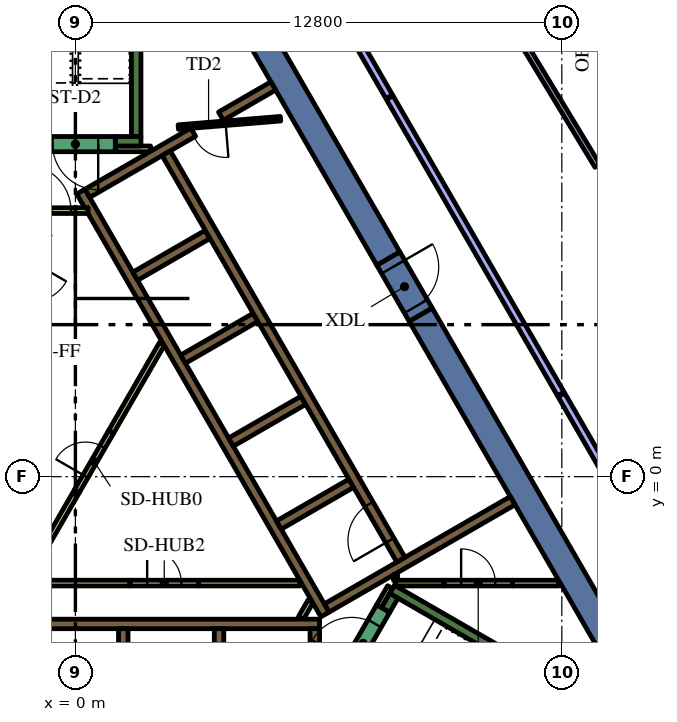
"""IFC4 building model, lengths in metres.
Left out: names, types, materials, properties, quantities, classifications, styles, units other than length and angle.
Written with IfcOpenShell. Run it as: python <this file> out.ifc"""

import sys

from ifc_helpers import new_model, si_unit, direction, frame, frame_2d, origin, place, context, subcontext, project, spatial, polyline, rectangle, outline, extrude, element, fill, save


model = new_model("IFC4")
c1 = context("Model", 3, precision=1e-05, world=origin(), true_north=direction((0.0, 1.0)))
c2 = subcontext(c1, "Body", "Model", "MODEL_VIEW")
j1 = project(units=[si_unit("LENGTHUNIT", "METRE"), si_unit("PLANEANGLEUNIT", "RADIAN")], contexts=[c1])
p1 = place(None, origin())
s1 = spatial("IfcSite", under=j1, at=p1, CompositionType="ELEMENT")
p2 = place(p1, origin())
s2 = spatial("IfcBuilding", under=s1, at=p2, CompositionType="ELEMENT")
p3 = place(p2, frame((0.0, 0.0, 205.8)))
s3 = spatial("IfcBuildingStorey", under=s2, at=p3, CompositionType="ELEMENT", Elevation=205.8)
for number, where, z_axis, x_axis in (
    (1, (9.085, 4.264, 0.0), (0.0, 0.0, 1.0), (0.5, -0.866, 0.0)),
    (2, (8.235, 5.736, 0.0), (0.0, 0.0, 1.0), (-0.5, 0.866, 0.0)),
):
    element("IfcWall", number, at=place(p3, frame(where, z_axis=z_axis, x_axis=x_axis)), inside=s3, PredefinedType="SOLIDWALL", context=c2, shape_type="SweptSolid", body=[
        extrude(rectangle(XDim=12.472, YDim=0.7, at=frame_2d((6.236, 0.0))), origin(), (0.0, 0.0, 1.0), 4.2),
    ])
p4 = place(p3, frame((8.334, -2.964, 0.0), z_axis=(0.0, 0.0, 1.0), x_axis=(0.866016039709, -0.500016218704, 0.0)))
e3 = element("IfcWall", 3, at=p4, inside=s3, PredefinedType="SOLIDWALL", context=c2, shape_type="SweptSolid", body=[
    extrude(rectangle(XDim=7.05, YDim=0.25, at=frame_2d((3.525, 0.0))), origin(), (0.0, 0.0, 1.0), 4.2),
])
p5 = place(p3, frame((8.163, -3.511, 0.0), z_axis=(0.0, 0.0, 1.0), x_axis=(0.500127794843, 0.865951608824, 0.0)))
e4 = element("IfcWall", 4, at=p5, inside=s3, PredefinedType="SOLIDWALL", context=c2, shape_type="SweptSolid", body=[
    extrude(rectangle(XDim=0.435, YDim=0.25, at=frame_2d((0.217, 0.0))), origin(), (0.0, 0.0, 1.0), 4.2),
])
p6 = place(p3, frame((1.6, 8.95, 0.0), z_axis=(0.0, 0.0, 1.0), x_axis=(0.0, 1.0, 0.0)))
e5 = element("IfcWall", 5, at=p6, inside=s3, PredefinedType="SOLIDWALL", context=c2, shape_type="SweptSolid", body=[
    extrude(rectangle(XDim=6.8, YDim=0.25, at=frame_2d((3.4, 0.0))), origin(), (0.0, 0.0, 1.0), 4.2),
])
p7 = place(p3, frame((1.05, 8.825, 0.0), z_axis=(0.0, 0.0, 1.0), x_axis=(1.0, 0.0, 0.0)))
e6 = element("IfcWall", 6, at=p7, inside=s3, PredefinedType="SOLIDWALL", context=c2, shape_type="SweptSolid", body=[
    extrude(rectangle(XDim=0.675, YDim=0.25, at=frame_2d((0.337, 0.0))), origin(), (0.0, 0.0, 1.0), 4.2),
])
p8 = place(p3, frame((-5.806, -3.875, 0.0), z_axis=(0.0, 0.0, 1.0), x_axis=(1.0, 0.0, 0.0)))
e7 = element("IfcWall", 7, at=p8, inside=s3, PredefinedType="SOLIDWALL", context=c2, shape_type="SweptSolid", body=[
    extrude(rectangle(XDim=12.231, YDim=0.25, at=frame_2d((6.116, 0.0))), origin(), (0.0, 0.0, 1.0), 4.2),
])
p9 = place(p3, frame((6.3, -7.24, 0.0), z_axis=(0.0, 0.0, 1.0), x_axis=(0.0, 1.0, 0.0)))
e8 = element("IfcWall", 8, at=p9, inside=s3, PredefinedType="SOLIDWALL", context=c2, shape_type="SweptSolid", body=[
    extrude(rectangle(XDim=3.24, YDim=0.25, at=frame_2d((1.62, 0.0))), origin(), (0.0, 0.0, 1.0), 4.2),
])
for number, where, z_axis, x_axis in (
    (9, (3.78, -4.0, 0.0), (0.0, 0.0, 1.0), (0.0, -1.0, 0.0)),
    (10, (1.26, -4.0, 0.0), (0.0, 0.0, 1.0), (0.0, -1.0, 0.0)),
):
    element("IfcWall", number, at=place(p3, frame(where, z_axis=z_axis, x_axis=x_axis)), inside=s3, PredefinedType="SOLIDWALL", context=c2, shape_type="SweptSolid", body=[
        extrude(rectangle(XDim=2.2, YDim=0.25, at=frame_2d((1.1, 0.0))), origin(), (0.0, 0.0, 1.0), 4.2),
    ])
p10 = place(p3, origin())
e11 = element("IfcWall", 11, at=p10, inside=s3, PredefinedType="SOLIDWALL", context=c2, shape_type="SweptSolid", body=[
    extrude(outline(polyline([(0.332, 6.925), (0.335, 6.925), (0.335, 6.925), (0.335, 6.925), (0.335, 7.075), (0.335, 7.075), (0.335, 7.075), (0.245, 7.075), (0.035, 7.439), (0.252, 7.564), (0.377, 7.348), (1.512, 5.382), (1.637, 5.165), (2.221, 4.153), (2.771, 3.199), (2.896, 2.983), (3.138, 2.564), (4.031, 1.017), (4.156, 0.801), (5.292, -1.165), (5.417, -1.382), (6.073, -2.519), (6.552, -3.348), (6.677, -3.564), (6.46, -3.689), (0.332, 6.925)])), origin(), (0.0, 0.0, 1.0), 4.2),
])
p11 = place(p3, frame((3.1, 9.064, 0.0), z_axis=(0.0, 0.0, 1.0), x_axis=(-0.866030133475, -0.499991807846, 0.0)))
e12 = element("IfcWall", 12, at=p11, inside=s3, PredefinedType="SOLIDWALL", context=c2, shape_type="SweptSolid", body=[
    extrude(rectangle(XDim=3.217, YDim=0.25, at=frame_2d((1.608, 0.0))), origin(), (0.0, 0.0, 1.0), 4.2),
])
p12 = place(p3, frame((1.574, 5.274, 0.0), z_axis=(0.0, 0.0, 1.0), x_axis=(0.866028486751, 0.499994660107, 0.0)))
e13 = element("IfcWall", 13, at=p12, inside=s3, PredefinedType="SOLIDWALL", context=c2, shape_type="SweptSolid", body=[
    extrude(rectangle(XDim=2.2, YDim=0.25, at=frame_2d((1.1, 0.0))), origin(), (0.0, 0.0, 1.0), 4.2),
])
for number, where, z_axis, x_axis in (
    (14, (2.834, 3.091, 0.0), (0.0, 0.0, 1.0), (0.866, 0.5, 0.0)),
    (15, (4.094, 0.909, 0.0), (0.0, 0.0, 1.0), (0.866, 0.5, 0.0)),
    (16, (5.354, -1.274, 0.0), (0.0, 0.0, 1.0), (0.866, 0.5, 0.0)),
):
    element("IfcWall", number, at=place(p3, frame(where, z_axis=z_axis, x_axis=x_axis)), inside=s3, PredefinedType="SOLIDWALL", context=c2, shape_type="SweptSolid", body=[
        extrude(rectangle(XDim=2.2, YDim=0.25, at=frame_2d((1.1, 0.0))), origin(), (0.0, 0.0, 1.0), 4.2),
    ])
p13 = place(p3, frame((11.507, -0.631, 0.0), z_axis=(0.0, 0.0, 1.0), x_axis=(-0.866011447264, -0.500024172624, 0.0)))
e17 = element("IfcWall", 17, at=p13, inside=s3, PredefinedType="SOLIDWALL", context=c2, shape_type="SweptSolid", body=[
    extrude(rectangle(XDim=5.65, YDim=0.25, at=frame_2d((2.825, 0.0))), origin(), (0.0, 0.0, 1.0), 4.2),
])
p14 = place(p3, frame((3.83, 9.486, 0.0), z_axis=(0.0, 0.0, 1.0), x_axis=(0.865986202621, 0.500067892261, 0.0)))
e18 = element("IfcWall", 18, at=p14, inside=s3, PredefinedType="SOLIDWALL", context=c2, shape_type="SweptSolid", body=[
    extrude(rectangle(XDim=1.591, YDim=0.25, at=frame_2d((0.795, 0.0))), origin(), (0.0, 0.0, 1.0), 4.2),
])
p15 = place(p3, frame((0.941, 1.179, 0.0), z_axis=(0.0, 0.0, 1.0), x_axis=(0.499962406319, 0.866047107418, 0.0)))
e19 = element("IfcWall", 19, at=p15, inside=s3, PredefinedType="PARTITIONING", context=c2, shape_type="SweptSolid", body=[
    extrude(rectangle(XDim=2.672, YDim=0.15, at=frame_2d((1.336, 0.0))), origin(), (0.0, 0.0, 1.0), 3.45),
])
p16 = place(p3, frame((1.438, -2.8, 0.0), z_axis=(0.0, 0.0, 1.0), x_axis=(-1.0, 0.0, 0.0)))
e20 = element("IfcWall", 20, at=p16, inside=s3, PredefinedType="PARTITIONING", context=c2, shape_type="SweptSolid", body=[
    extrude(rectangle(XDim=7.781, YDim=0.15, at=frame_2d((3.891, 0.0))), origin(), (0.0, 0.0, 1.0), 3.45),
])
for number, where, z_axis, x_axis in (
    (21, (-1.295, -2.693, 0.0), (0.0, 0.0, 1.0), (0.5, 0.866, 0.0)),
    (22, (3.238, -2.8, 0.0), (0.0, 0.0, 1.0), (1.0, 0.0, 0.0)),
):
    element("IfcWall", number, at=place(p3, frame(where, z_axis=z_axis, x_axis=x_axis)), inside=s3, PredefinedType="PARTITIONING", context=c2, shape_type="SweptSolid", body=[
        extrude(rectangle(XDim=2.672, YDim=0.15, at=frame_2d((1.336, 0.0))), origin(), (0.0, 0.0, 1.0), 3.45),
    ])
p17 = place(p3, frame((1.05, 8.625, 0.0), z_axis=(0.0, 0.0, 1.0), x_axis=(1.0, 0.0, 0.0)))
e23 = element("IfcWall", 23, at=p17, inside=s3, PredefinedType="PARTITIONING", context=c2, shape_type="SweptSolid", body=[
    extrude(rectangle(XDim=0.929, YDim=0.15, at=frame_2d((0.464, 0.0))), origin(), (0.0, 0.0, 1.0), 3.45),
])
p18 = place(p3, frame((8.412, -2.8, 0.0), z_axis=(0.0, 0.0, 1.0), x_axis=(1.0, 0.0, 0.0)))
e24 = element("IfcWall", 24, at=p18, inside=s3, PredefinedType="PARTITIONING", context=c2, shape_type="SweptSolid", body=[
    extrude(rectangle(XDim=1.288, YDim=0.15, at=frame_2d((0.644, 0.0))), origin(), (0.0, 0.0, 1.0), 4.2),
])
p19 = place(p3, frame((8.37, -2.65, 0.0), z_axis=(0.0, 0.0, 1.0), x_axis=(1.0, 0.0, 0.0)))
e25 = element("IfcWall", 25, at=p19, inside=s3, PredefinedType="PARTITIONING", context=c2, shape_type="SweptSolid", body=[
    extrude(rectangle(XDim=0.108, YDim=0.15, at=frame_2d((0.054, 0.0))), origin(), (0.0, 0.0, 1.0), 4.2),
])
p20 = place(p3, frame((8.281, -2.907, 0.0), z_axis=(0.0, 0.0, 1.0), x_axis=(-0.500193841991, -0.86591346013, 0.0)))
e26 = element("IfcWall", 26, at=p20, inside=s3, PredefinedType="PARTITIONING", context=c2, shape_type="SweptSolid", body=[
    extrude(rectangle(XDim=0.583, YDim=0.15, at=frame_2d((0.292, 0.0))), origin(), (0.0, 0.0, 1.0), 4.2),
])
p21 = place(p3, frame((11.5, -2.801, 0.0), z_axis=(0.0, 0.0, 1.0), x_axis=(1.0, 0.0, 0.0)))
e27 = element("IfcWall", 27, at=p21, inside=s3, PredefinedType="PARTITIONING", context=c2, shape_type="SweptSolid", body=[
    extrude(rectangle(XDim=1.222, YDim=0.15, at=frame_2d((0.611, 0.0))), origin(), (0.0, 0.0, 1.0), 3.45),
])
p22 = place(p3, frame((5.936, -3.718, 0.0), z_axis=(0.0, 0.0, 1.0), x_axis=(0.499890179513, 0.866088799389, 0.0)))
e28 = element("IfcWall", 28, at=p22, inside=s3, PredefinedType="PARTITIONING", context=c2, shape_type="SweptSolid", body=[
    extrude(rectangle(XDim=0.504, YDim=0.15, at=frame_2d((0.252, 0.0))), origin(), (0.0, 0.0, 1.0), 3.45),
])
p23 = place(p3, frame((8.565, -2.185, 0.0), z_axis=(0.0, 0.0, 1.0), x_axis=(-0.499997954832, 0.866026584559, 0.0)))
e29 = element("IfcWall", 29, at=p23, inside=s3, PredefinedType="SOLIDWALL", context=c2, shape_type="SweptSolid", body=[
    extrude(rectangle(XDim=12.35, YDim=0.25, at=frame_2d((6.175, 0.0))), origin(), (0.0, 0.0, 1.0), 4.2),
])
p24 = place(p23, frame((0.585, 0.0, 0.0)))
e30 = element("IfcOpeningElement", 30, at=p24, cuts=e29, PredefinedType="OPENING", context=c2, shape_type="SweptSolid", body=[
    extrude(rectangle(XDim=1.1, YDim=2.1, at=frame_2d((0.55, 1.05))), frame((0.0, 0.135, 0.0), z_axis=(0.0, -1.0, 0.0), x_axis=(1.0, 0.0, 0.0)), (0.0, 0.0, 1.0), 0.27),
])
p25 = place(p3, frame((7.048, -5.292, 0.0), z_axis=(0.0, 0.0, 1.0), x_axis=(0.49994051562, 0.866059744384, 0.0)))
e31 = element("IfcWall", 31, at=p25, inside=s3, PredefinedType="SOLIDWALL", context=c2, shape_type="SweptSolid", body=[
    extrude(rectangle(XDim=2.1, YDim=0.4, at=frame_2d((1.05, 0.0))), origin(), (0.0, 0.0, 1.0), 4.2),
])
p26 = place(p25, frame((0.45, 0.0, 0.0)))
e32 = element("IfcOpeningElement", 32, at=p26, cuts=e31, PredefinedType="OPENING", context=c2, shape_type="SweptSolid", body=[
    extrude(rectangle(XDim=1.2, YDim=2.1, at=frame_2d((0.6, 1.05))), frame((0.0, 0.21, 0.0), z_axis=(0.0, -1.0, 0.0), x_axis=(1.0, 0.0, 0.0)), (0.0, 0.0, 1.0), 0.42),
])
p27 = place(p3, frame((1.05, 8.75, 0.0), z_axis=(0.0, 0.0, 1.0), x_axis=(-1.0, 0.0, 0.0)))
e33 = element("IfcWall", 33, at=p27, inside=s3, PredefinedType="SOLIDWALL", context=c2, shape_type="SweptSolid", body=[
    extrude(rectangle(XDim=2.1, YDim=0.4, at=frame_2d((1.05, 0.0))), origin(), (0.0, 0.0, 1.0), 4.2),
])
p28 = place(p27, frame((0.45, 0.0, 0.0)))
e34 = element("IfcOpeningElement", 34, at=p28, cuts=e33, PredefinedType="OPENING", context=c2, shape_type="SweptSolid", body=[
    extrude(rectangle(XDim=1.2, YDim=2.1, at=frame_2d((0.6, 1.05))), frame((0.0, 0.21, 0.0), z_axis=(0.0, -1.0, 0.0), x_axis=(1.0, 0.0, 0.0)), (0.0, 0.0, 1.0), 0.42),
])
p29 = place(p3, frame((5.398, 9.419, 0.0), z_axis=(0.0, 0.0, 1.0), x_axis=(-0.996653416376, -0.081743303248, 0.0)))
e35 = element("IfcWall", 35, at=p29, inside=s3, PredefinedType="PARTITIONING", context=c2, shape_type="SweptSolid", body=[
    extrude(rectangle(XDim=2.7, YDim=0.12, at=frame_2d((1.35, 0.0))), origin(), (0.0, 0.0, 1.0), 3.45),
])
p30 = place(p29, frame((1.45, 0.0, 0.0)))
e36 = element("IfcOpeningElement", 36, at=p30, cuts=e35, PredefinedType="OPENING", context=c2, shape_type="SweptSolid", body=[
    extrude(rectangle(XDim=0.9, YDim=2.1, at=frame_2d((0.45, 1.05))), frame((0.0, 0.07, 0.0), z_axis=(0.0, -1.0, 0.0), x_axis=(1.0, 0.0, 0.0)), (0.0, 0.0, 1.0), 0.14),
])
p31 = place(p3, frame((-1.765, 7.0, 0.0), z_axis=(0.0, 0.0, 1.0), x_axis=(1.0, 0.0, 0.0)))
e37 = element("IfcWall", 37, at=p31, inside=s3, PredefinedType="PARTITIONING", context=c2, shape_type="SweptSolid", body=[
    extrude(rectangle(XDim=2.1, YDim=0.15, at=frame_2d((1.05, 0.0))), origin(), (0.0, 0.0, 1.0), 3.45),
])
p32 = place(p31, frame((0.45, 0.0, 0.0)))
e38 = element("IfcOpeningElement", 38, at=p32, cuts=e37, PredefinedType="OPENING", context=c2, shape_type="SweptSolid", body=[
    extrude(rectangle(XDim=1.2, YDim=2.1, at=frame_2d((0.6, 1.05))), frame((0.0, 0.085, 0.0), z_axis=(0.0, -1.0, 0.0), x_axis=(1.0, 0.0, 0.0)), (0.0, 0.0, 1.0), 0.17),
])
p33 = place(p3, frame((8.235, 5.736, 0.0), z_axis=(0.0, 0.0, 1.0), x_axis=(0.499954529098, -0.86605165483, 0.0)))
e39 = element("IfcWall", 39, at=p33, inside=s3, PredefinedType="SOLIDWALL", context=c2, shape_type="SweptSolid", body=[
    extrude(rectangle(XDim=1.7, YDim=0.7, at=frame_2d((0.85, 0.0))), origin(), (0.0, 0.0, 1.0), 4.2),
])
p34 = place(p33, frame((0.25, 0.0, 0.0)))
e40 = element("IfcOpeningElement", 40, at=p34, cuts=e39, PredefinedType="OPENING", context=c2, shape_type="SweptSolid", body=[
    extrude(rectangle(XDim=1.2, YDim=2.1, at=frame_2d((0.6, 1.05))), frame((0.0, 0.36, 0.0), z_axis=(0.0, -1.0, 0.0), x_axis=(1.0, 0.0, 0.0)), (0.0, 0.0, 1.0), 0.72),
])
p35 = place(p3, frame((0.041, -0.379, 0.0), z_axis=(0.0, 0.0, 1.0), x_axis=(0.499961193289, 0.866047807691, 0.0)))
e41 = element("IfcWall", 41, at=p35, inside=s3, PredefinedType="PARTITIONING", context=c2, shape_type="SweptSolid", body=[
    extrude(rectangle(XDim=1.8, YDim=0.15, at=frame_2d((0.9, 0.0))), origin(), (0.0, 0.0, 1.0), 3.45),
])
p36 = place(p35, frame((0.45, 0.0, 0.0)))
e42 = element("IfcOpeningElement", 42, at=p36, cuts=e41, PredefinedType="OPENING", context=c2, shape_type="SweptSolid", body=[
    extrude(rectangle(XDim=0.9, YDim=2.1, at=frame_2d((0.45, 1.05))), frame((0.0, 0.085, 0.0), z_axis=(0.0, -1.0, 0.0), x_axis=(1.0, 0.0, 0.0)), (0.0, 0.0, 1.0), 0.17),
])
p37 = place(p3, frame((1.438, -2.8, 0.0), z_axis=(0.0, 0.0, 1.0), x_axis=(1.0, 0.0, 0.0)))
e43 = element("IfcWall", 43, at=p37, inside=s3, PredefinedType="PARTITIONING", context=c2, shape_type="SweptSolid", body=[
    extrude(rectangle(XDim=1.8, YDim=0.15, at=frame_2d((0.9, 0.0))), origin(), (0.0, 0.0, 1.0), 3.45),
])
p38 = place(p37, frame((0.45, 0.0, 0.0)))
e44 = element("IfcOpeningElement", 44, at=p38, cuts=e43, PredefinedType="OPENING", context=c2, shape_type="SweptSolid", body=[
    extrude(rectangle(XDim=0.9, YDim=2.1, at=frame_2d((0.45, 1.05))), frame((0.0, 0.085, 0.0), z_axis=(0.0, -1.0, 0.0), x_axis=(1.0, 0.0, 0.0)), (0.0, 0.0, 1.0), 0.17),
])
p39 = place(p3, frame((9.7, -2.8, 0.0), z_axis=(0.0, 0.0, 1.0), x_axis=(1.0, 0.0, 0.0)))
e45 = element("IfcWall", 45, at=p39, inside=s3, PredefinedType="PARTITIONING", context=c2, shape_type="SweptSolid", body=[
    extrude(rectangle(XDim=1.8, YDim=0.15, at=frame_2d((0.9, 0.0))), origin(), (0.0, 0.0, 1.0), 3.45),
])
p40 = place(p39, frame((0.45, 0.0, 0.0)))
e46 = element("IfcOpeningElement", 46, at=p40, cuts=e45, PredefinedType="OPENING", context=c2, shape_type="SweptSolid", body=[
    extrude(rectangle(XDim=0.9, YDim=2.1, at=frame_2d((0.45, 1.05))), frame((0.0, 0.085, 0.0), z_axis=(0.0, -1.0, 0.0), x_axis=(1.0, 0.0, 0.0)), (0.0, 0.0, 1.0), 0.17),
])
p41 = place(p3, frame((13.737, 8.178, 0.0), z_axis=(0.0, 0.0, 1.0), x_axis=(-0.517884383874, 0.855450620983, 0.0)))
e47 = element("IfcWall", 47, at=p41, inside=s3, PredefinedType="PARTITIONING", context=c2, shape_type="SweptSolid", body=[
    extrude(rectangle(XDim=6.043, YDim=0.15, at=frame_2d((3.021, 0.0))), origin(), (0.0, 0.0, 1.0), 3.45),
])
p42 = place(p3, frame((12.772, 2.178, 0.0), z_axis=(0.0, 0.0, 1.0), x_axis=(-0.5000018851, 0.866024315419, 0.0)))
e48 = element("IfcWall", 48, at=p42, inside=s3, PredefinedType="PARTITIONING", context=c2, shape_type="SweptSolid", body=[
    extrude(rectangle(XDim=9.0, YDim=0.2, at=frame_2d((4.5, 0.0))), origin(), (0.0, 0.0, 1.0), 3.45),
])
p43 = place(p3, frame((8.257, 9.998, 0.0), z_axis=(0.0, 0.0, 1.0), x_axis=(-0.499998405424, 0.866026324412, 0.0)))
e49 = element("IfcWall", 49, at=p43, inside=s3, PredefinedType="PARTITIONING", context=c2, shape_type="SweptSolid", body=[
    extrude(rectangle(XDim=9.267, YDim=0.2, at=frame_2d((4.633, 0.0))), origin(), (0.0, 0.0, 1.0), 3.45),
])
p44 = place(p3, frame((17.681, -6.324, 0.0), z_axis=(0.0, 0.0, 1.0), x_axis=(-0.500021153861, 0.866013190252, 0.0)))
e50 = element("IfcWall", 50, at=p44, inside=s3, PredefinedType="PARTITIONING", context=c2, shape_type="SweptSolid", body=[
    extrude(rectangle(XDim=9.787, YDim=0.2, at=frame_2d((4.894, 0.0))), origin(), (0.0, 0.0, 1.0), 3.45),
])
p45 = place(p44, frame((4.4, 0.0, 0.0)))
e51 = element("IfcOpeningElement", 51, at=p45, cuts=e50, PredefinedType="OPENING", context=c2, shape_type="SweptSolid", body=[
    extrude(rectangle(XDim=1.0, YDim=2.1, at=frame_2d((0.5, 1.05))), frame((0.0, 0.11, 0.0), z_axis=(0.0, -1.0, 0.0), x_axis=(1.0, 0.0, 0.0)), (0.0, 0.0, 1.0), 0.22),
])
p46 = place(p24, origin())
e52 = element("IfcDoor", 52, at=p46, inside=s3, OperationType="DOUBLE_DOOR_SLIDING", PredefinedType="DOOR", context=c2, shape_type="SweptSolid", body=[
    extrude(rectangle(XDim=1.1, YDim=2.1, at=frame_2d((0.55, 1.05))), frame((0.0, 0.025, 0.0), z_axis=(0.0, -1.0, 0.0), x_axis=(1.0, 0.0, 0.0)), (0.0, 0.0, 1.0), 0.05),
])
fill(e30, e52)
p47 = place(p26, origin())
e53 = element("IfcDoor", 53, at=p47, inside=s3, OperationType="SINGLE_SWING_LEFT", PredefinedType="DOOR", context=c2, shape_type="SweptSolid", body=[
    extrude(rectangle(XDim=1.2, YDim=2.1, at=frame_2d((0.6, 1.05))), frame((0.0, 0.025, 0.0), z_axis=(0.0, -1.0, 0.0), x_axis=(1.0, 0.0, 0.0)), (0.0, 0.0, 1.0), 0.05),
])
fill(e32, e53)
p48 = place(p28, origin())
e54 = element("IfcDoor", 54, at=p48, inside=s3, OperationType="SINGLE_SWING_LEFT", PredefinedType="DOOR", context=c2, shape_type="SweptSolid", body=[
    extrude(rectangle(XDim=1.2, YDim=2.1, at=frame_2d((0.6, 1.05))), frame((0.0, 0.025, 0.0), z_axis=(0.0, -1.0, 0.0), x_axis=(1.0, 0.0, 0.0)), (0.0, 0.0, 1.0), 0.05),
])
fill(e34, e54)
p49 = place(p30, origin())
e55 = element("IfcDoor", 55, at=p49, inside=s3, OperationType="SINGLE_SWING_LEFT", PredefinedType="DOOR", context=c2, shape_type="SweptSolid", body=[
    extrude(rectangle(XDim=0.9, YDim=2.1, at=frame_2d((0.45, 1.05))), frame((0.0, 0.025, 0.0), z_axis=(0.0, -1.0, 0.0), x_axis=(1.0, 0.0, 0.0)), (0.0, 0.0, 1.0), 0.05),
])
fill(e36, e55)
p50 = place(p32, origin())
e56 = element("IfcDoor", 56, at=p50, inside=s3, OperationType="SINGLE_SWING_LEFT", PredefinedType="DOOR", context=c2, shape_type="SweptSolid", body=[
    extrude(rectangle(XDim=1.2, YDim=2.1, at=frame_2d((0.6, 1.05))), frame((0.0, 0.025, 0.0), z_axis=(0.0, -1.0, 0.0), x_axis=(1.0, 0.0, 0.0)), (0.0, 0.0, 1.0), 0.05),
])
fill(e38, e56)
p51 = place(p34, origin())
e57 = element("IfcDoor", 57, at=p51, inside=s3, OperationType="SINGLE_SWING_LEFT", PredefinedType="DOOR", context=c2, shape_type="SweptSolid", body=[
    extrude(rectangle(XDim=1.2, YDim=2.1, at=frame_2d((0.6, 1.05))), frame((0.0, 0.025, 0.0), z_axis=(0.0, -1.0, 0.0), x_axis=(1.0, 0.0, 0.0)), (0.0, 0.0, 1.0), 0.05),
])
fill(e40, e57)
p52 = place(p36, origin())
e58 = element("IfcDoor", 58, at=p52, inside=s3, OperationType="SINGLE_SWING_LEFT", PredefinedType="DOOR", context=c2, shape_type="SweptSolid", body=[
    extrude(rectangle(XDim=0.9, YDim=2.1, at=frame_2d((0.45, 1.05))), frame((0.0, 0.025, 0.0), z_axis=(0.0, -1.0, 0.0), x_axis=(1.0, 0.0, 0.0)), (0.0, 0.0, 1.0), 0.05),
])
fill(e42, e58)
p53 = place(p38, origin())
e59 = element("IfcDoor", 59, at=p53, inside=s3, OperationType="SINGLE_SWING_LEFT", PredefinedType="DOOR", context=c2, shape_type="SweptSolid", body=[
    extrude(rectangle(XDim=0.9, YDim=2.1, at=frame_2d((0.45, 1.05))), frame((0.0, 0.025, 0.0), z_axis=(0.0, -1.0, 0.0), x_axis=(1.0, 0.0, 0.0)), (0.0, 0.0, 1.0), 0.05),
])
fill(e44, e59)
p54 = place(p40, origin())
e60 = element("IfcDoor", 60, at=p54, inside=s3, OperationType="SINGLE_SWING_LEFT", PredefinedType="DOOR", context=c2, shape_type="SweptSolid", body=[
    extrude(rectangle(XDim=0.9, YDim=2.1, at=frame_2d((0.45, 1.05))), frame((0.0, 0.025, 0.0), z_axis=(0.0, -1.0, 0.0), x_axis=(1.0, 0.0, 0.0)), (0.0, 0.0, 1.0), 0.05),
])
fill(e46, e60)
save(model, sys.argv[1])
